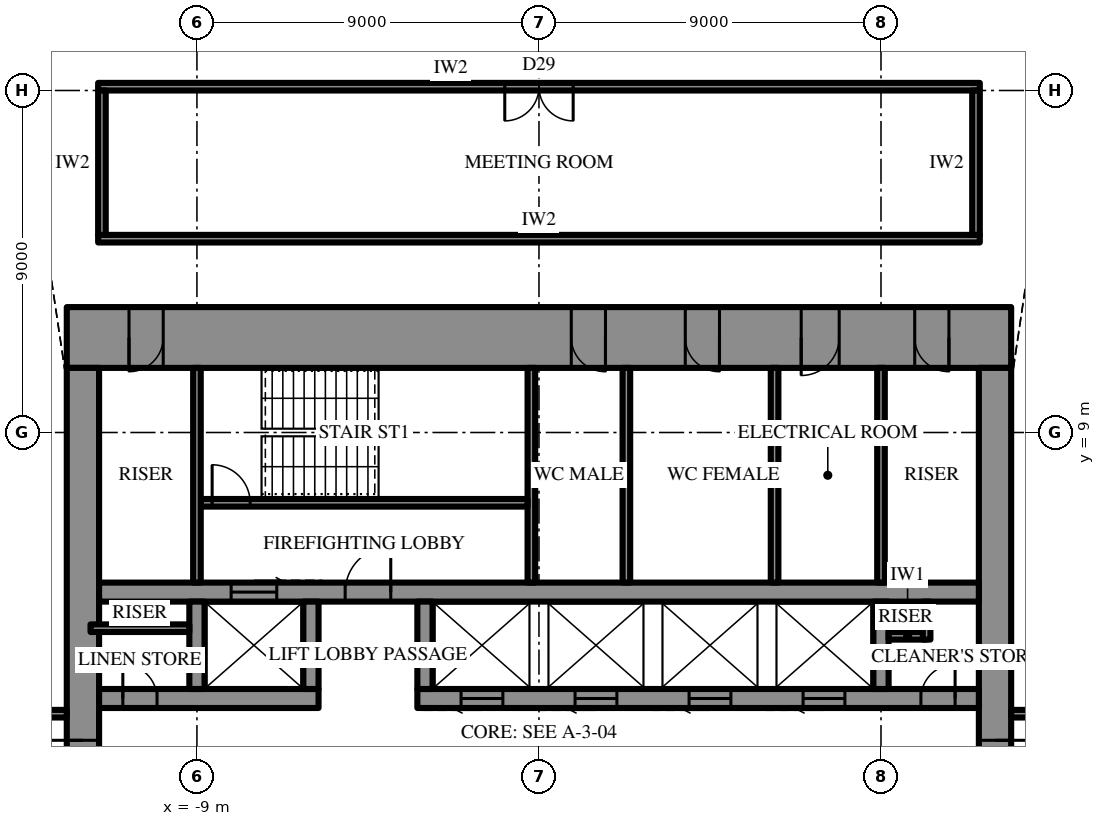
"""IFC4 building model, lengths in metres.
Left out: names, types, materials, properties, quantities, classifications, styles, units other than length and angle.
Written with IfcOpenShell. Run it as: python <this file> out.ifc"""

import sys

from ifc_helpers import new_model, si_unit, direction, frame, frame_2d, origin, place, context, subcontext, project, spatial, rectangle, extrude, element, fill, save


model = new_model("IFC4")
c1 = context("Model", 3, precision=1e-05, world=origin(), true_north=direction((0.0, 1.0)))
c2 = subcontext(c1, "Body", "Model", "MODEL_VIEW")
j1 = project(units=[si_unit("LENGTHUNIT", "METRE"), si_unit("PLANEANGLEUNIT", "RADIAN")], contexts=[c1])
p1 = place(None, origin())
s1 = spatial("IfcSite", under=j1, at=p1, CompositionType="ELEMENT")
p2 = place(p1, origin())
s2 = spatial("IfcBuilding", under=s1, at=p2, CompositionType="ELEMENT")
p3 = place(p2, frame((0.0, 0.0, 319.9)))
s3 = spatial("IfcBuildingStorey", under=s2, at=p3, CompositionType="ELEMENT", Elevation=319.9)
p4 = place(p3, frame((-12.425, 11.5, 0.0), z_axis=(0.0, 0.0, 1.0), x_axis=(1.0, 0.0, 0.0)))
e1 = element("IfcWall", 1, at=p4, inside=s3, PredefinedType="SHEAR", context=c2, shape_type="SweptSolid", body=[
    extrude(rectangle(XDim=24.85, YDim=1.6, at=frame_2d((12.425, 0.0))), origin(), (0.0, 0.0, 1.0), 4.2),
])
p5 = place(p4, frame((13.275, 0.0, 0.0)))
e2 = element("IfcOpeningElement", 2, at=p5, cuts=e1, PredefinedType="OPENING", context=c2, shape_type="SweptSolid", body=[
    extrude(rectangle(XDim=0.9, YDim=2.2, at=frame_2d((0.45, 1.1))), frame((0.0, 0.81, 0.0), z_axis=(0.0, -1.0, 0.0), x_axis=(1.0, 0.0, 0.0)), (0.0, 0.0, 1.0), 1.62),
])
p6 = place(p4, frame((16.275, 0.0, 0.0)))
e3 = element("IfcOpeningElement", 3, at=p6, cuts=e1, PredefinedType="OPENING", context=c2, shape_type="SweptSolid", body=[
    extrude(rectangle(XDim=0.9, YDim=2.2, at=frame_2d((0.45, 1.1))), frame((0.0, 0.81, 0.0), z_axis=(0.0, -1.0, 0.0), x_axis=(1.0, 0.0, 0.0)), (0.0, 0.0, 1.0), 1.62),
])
p7 = place(p4, frame((19.325, 0.0, 0.0)))
e4 = element("IfcOpeningElement", 4, at=p7, cuts=e1, PredefinedType="OPENING", context=c2, shape_type="SweptSolid", body=[
    extrude(rectangle(XDim=1.0, YDim=2.2, at=frame_2d((0.5, 1.1))), frame((0.0, 0.81, 0.0), z_axis=(0.0, -1.0, 0.0), x_axis=(1.0, 0.0, 0.0)), (0.0, 0.0, 1.0), 1.62),
])
p8 = place(p4, frame((1.637, 0.0, 0.0)))
e5 = element("IfcOpeningElement", 5, at=p8, cuts=e1, PredefinedType="OPENING", context=c2, shape_type="SweptSolid", body=[
    extrude(rectangle(XDim=0.9, YDim=2.2, at=frame_2d((0.45, 1.1))), frame((0.0, 0.81, 0.0), z_axis=(0.0, -1.0, 0.0), x_axis=(1.0, 0.0, 0.0)), (0.0, 0.0, 1.0), 1.62),
])
p9 = place(p4, frame((22.312, 0.0, 0.0)))
e6 = element("IfcOpeningElement", 6, at=p9, cuts=e1, PredefinedType="OPENING", context=c2, shape_type="SweptSolid", body=[
    extrude(rectangle(XDim=0.9, YDim=2.2, at=frame_2d((0.45, 1.1))), frame((0.0, 0.81, 0.0), z_axis=(0.0, -1.0, 0.0), x_axis=(1.0, 0.0, 0.0)), (0.0, 0.0, 1.0), 1.62),
])
p10 = place(p3, frame((12.0, -10.7, 0.0), z_axis=(0.0, 0.0, 1.0), x_axis=(0.0, 1.0, 0.0)))
e7 = element("IfcWall", 7, at=p10, inside=s3, PredefinedType="SHEAR", context=c2, shape_type="SweptSolid", body=[
    extrude(rectangle(XDim=21.4, YDim=0.85, at=frame_2d((10.7, 0.0))), origin(), (0.0, 0.0, 1.0), 4.2),
])
p11 = place(p10, frame((9.8, 0.0, 0.0)))
e8 = element("IfcOpeningElement", 8, at=p11, cuts=e7, PredefinedType="OPENING", context=c2, shape_type="SweptSolid", body=[
    extrude(rectangle(XDim=1.8, YDim=2.4, at=frame_2d((0.9, 1.2))), frame((0.0, 0.435, 0.0), z_axis=(0.0, -1.0, 0.0), x_axis=(1.0, 0.0, 0.0)), (0.0, 0.0, 1.0), 0.87),
])
p12 = place(p3, frame((-12.0, 10.7, 0.0), z_axis=(0.0, 0.0, 1.0), x_axis=(0.0, -1.0, 0.0)))
e9 = element("IfcWall", 9, at=p12, inside=s3, PredefinedType="SHEAR", context=c2, shape_type="SweptSolid", body=[
    extrude(rectangle(XDim=21.4, YDim=0.85, at=frame_2d((10.7, 0.0))), origin(), (0.0, 0.0, 1.0), 4.2),
])
p13 = place(p12, frame((9.8, 0.0, 0.0)))
e10 = element("IfcOpeningElement", 10, at=p13, cuts=e9, PredefinedType="OPENING", context=c2, shape_type="SweptSolid", body=[
    extrude(rectangle(XDim=1.8, YDim=2.4, at=frame_2d((0.9, 1.2))), frame((0.0, 0.435, 0.0), z_axis=(0.0, -1.0, 0.0), x_axis=(1.0, 0.0, 0.0)), (0.0, 0.0, 1.0), 0.87),
])
p14 = place(p3, frame((-11.575, 2.0, 0.0), z_axis=(0.0, 0.0, 1.0), x_axis=(1.0, 0.0, 0.0)))
e11 = element("IfcWall", 11, at=p14, inside=s3, PredefinedType="SHEAR", context=c2, shape_type="SweptSolid", body=[
    extrude(rectangle(XDim=5.775, YDim=0.5, at=frame_2d((2.887, 0.0))), origin(), (0.0, 0.0, 1.0), 4.2),
])
p15 = place(p14, frame((0.625, 0.0, 0.0)))
e12 = element("IfcOpeningElement", 12, at=p15, cuts=e11, PredefinedType="OPENING", context=c2, shape_type="SweptSolid", body=[
    extrude(rectangle(XDim=0.9, YDim=2.2, at=frame_2d((0.45, 1.1))), frame((0.0, 0.26, 0.0), z_axis=(0.0, -1.0, 0.0), x_axis=(1.0, 0.0, 0.0)), (0.0, 0.0, 1.0), 0.52),
])
p16 = place(p3, frame((-3.2, 2.0, 0.0), z_axis=(0.0, 0.0, 1.0), x_axis=(1.0, 0.0, 0.0)))
e13 = element("IfcWall", 13, at=p16, inside=s3, PredefinedType="SHEAR", context=c2, shape_type="SweptSolid", body=[
    extrude(rectangle(XDim=14.775, YDim=0.5, at=frame_2d((7.387, 0.0))), origin(), (0.0, 0.0, 1.0), 4.2),
])
p17 = place(p16, frame((13.25, 0.0, 0.0)))
e14 = element("IfcOpeningElement", 14, at=p17, cuts=e13, PredefinedType="OPENING", context=c2, shape_type="SweptSolid", body=[
    extrude(rectangle(XDim=0.9, YDim=2.2, at=frame_2d((0.45, 1.1))), frame((0.0, 0.26, 0.0), z_axis=(0.0, -1.0, 0.0), x_axis=(1.0, 0.0, 0.0)), (0.0, 0.0, 1.0), 0.52),
])
p18 = place(p16, frame((1.15, 0.0, 0.0)))
e15 = element("IfcOpeningElement", 15, at=p18, cuts=e13, PredefinedType="OPENING", context=c2, shape_type="SweptSolid", body=[
    extrude(rectangle(XDim=1.1, YDim=2.2, at=frame_2d((0.55, 1.1))), frame((0.0, 0.26, 0.0), z_axis=(0.0, -1.0, 0.0), x_axis=(1.0, 0.0, 0.0)), (0.0, 0.0, 1.0), 0.52),
])
p19 = place(p16, frame((4.15, 0.0, 0.0)))
e16 = element("IfcOpeningElement", 16, at=p19, cuts=e13, PredefinedType="OPENING", context=c2, shape_type="SweptSolid", body=[
    extrude(rectangle(XDim=1.1, YDim=2.2, at=frame_2d((0.55, 1.1))), frame((0.0, 0.26, 0.0), z_axis=(0.0, -1.0, 0.0), x_axis=(1.0, 0.0, 0.0)), (0.0, 0.0, 1.0), 0.52),
])
p20 = place(p16, frame((7.15, 0.0, 0.0)))
e17 = element("IfcOpeningElement", 17, at=p20, cuts=e13, PredefinedType="OPENING", context=c2, shape_type="SweptSolid", body=[
    extrude(rectangle(XDim=1.1, YDim=2.2, at=frame_2d((0.55, 1.1))), frame((0.0, 0.26, 0.0), z_axis=(0.0, -1.0, 0.0), x_axis=(1.0, 0.0, 0.0)), (0.0, 0.0, 1.0), 0.52),
])
p21 = place(p16, frame((10.15, 0.0, 0.0)))
e18 = element("IfcOpeningElement", 18, at=p21, cuts=e13, PredefinedType="OPENING", context=c2, shape_type="SweptSolid", body=[
    extrude(rectangle(XDim=1.1, YDim=2.2, at=frame_2d((0.55, 1.1))), frame((0.0, 0.26, 0.0), z_axis=(0.0, -1.0, 0.0), x_axis=(1.0, 0.0, 0.0)), (0.0, 0.0, 1.0), 0.52),
])
p22 = place(p3, frame((-11.575, 4.8, 0.0), z_axis=(0.0, 0.0, 1.0), x_axis=(1.0, 0.0, 0.0)))
e19 = element("IfcWall", 19, at=p22, inside=s3, PredefinedType="SHEAR", context=c2, shape_type="SweptSolid", body=[
    extrude(rectangle(XDim=23.15, YDim=0.5, at=frame_2d((11.575, 0.0))), origin(), (0.0, 0.0, 1.0), 4.2),
])
p23 = place(p22, frame((6.475, 0.0, 0.0)))
e20 = element("IfcOpeningElement", 20, at=p23, cuts=e19, PredefinedType="OPENING", context=c2, shape_type="SweptSolid", body=[
    extrude(rectangle(XDim=1.2, YDim=2.2, at=frame_2d((0.6, 1.1))), frame((0.0, 0.26, 0.0), z_axis=(0.0, -1.0, 0.0), x_axis=(1.0, 0.0, 0.0)), (0.0, 0.0, 1.0), 0.52),
])
p24 = place(p22, frame((3.475, 0.0, 0.0)))
e21 = element("IfcOpeningElement", 21, at=p24, cuts=e19, PredefinedType="OPENING", context=c2, shape_type="SweptSolid", body=[
    extrude(rectangle(XDim=1.2, YDim=2.2, at=frame_2d((0.6, 1.1))), frame((0.0, 0.26, 0.0), z_axis=(0.0, -1.0, 0.0), x_axis=(1.0, 0.0, 0.0)), (0.0, 0.0, 1.0), 0.52),
])
for number, where, z_axis, x_axis in (
    (22, (-9.0, 2.25, 0.0), (0.0, 0.0, 1.0), (0.0, 1.0, 0.0)),
    (23, (-6.0, 2.25, 0.0), (0.0, 0.0, 1.0), (0.0, 1.0, 0.0)),
    (24, (-3.0, 2.25, 0.0), (0.0, 0.0, 1.0), (0.0, 1.0, 0.0)),
    (25, (9.0, 2.25, 0.0), (0.0, 0.0, 1.0), (0.0, 1.0, 0.0)),
):
    element("IfcWall", number, at=place(p3, frame(where, z_axis=z_axis, x_axis=x_axis)), inside=s3, PredefinedType="SHEAR", context=c2, shape_type="SweptSolid", body=[
        extrude(rectangle(XDim=2.3, YDim=0.4, at=frame_2d((1.15, 0.0))), origin(), (0.0, 0.0, 1.0), 4.2),
    ])
p25 = place(p3, frame((-0.2, 5.05, 0.0), z_axis=(0.0, 0.0, 1.0), x_axis=(0.0, 1.0, 0.0)))
e26 = element("IfcWall", 26, at=p25, inside=s3, PredefinedType="SHEAR", context=c2, shape_type="SweptSolid", body=[
    extrude(rectangle(XDim=5.65, YDim=0.2, at=frame_2d((2.825, 0.0))), origin(), (0.0, 0.0, 1.0), 4.2),
])
p26 = place(p3, frame((-8.9, 7.15, 0.0), z_axis=(0.0, 0.0, 1.0), x_axis=(1.0, 0.0, 0.0)))
e27 = element("IfcWall", 27, at=p26, inside=s3, PredefinedType="SHEAR", context=c2, shape_type="SweptSolid", body=[
    extrude(rectangle(XDim=8.6, YDim=0.2, at=frame_2d((4.3, 0.0))), origin(), (0.0, 0.0, 1.0), 4.2),
])
p27 = place(p26, frame((0.3, 0.0, 0.0)))
e28 = element("IfcOpeningElement", 28, at=p27, cuts=e27, PredefinedType="OPENING", context=c2, shape_type="SweptSolid", body=[
    extrude(rectangle(XDim=1.0, YDim=2.2, at=frame_2d((0.5, 1.1))), frame((0.0, 0.11, 0.0), z_axis=(0.0, -1.0, 0.0), x_axis=(1.0, 0.0, 0.0)), (0.0, 0.0, 1.0), 0.22),
])
for number, where, z_axis, x_axis in (
    (29, (-9.0, 5.05, 0.0), (0.0, 0.0, 1.0), (0.0, 1.0, 0.0)),
    (30, (9.0, 5.05, 0.0), (0.0, 0.0, 1.0), (0.0, 1.0, 0.0)),
    (31, (2.3, 5.05, 0.0), (0.0, 0.0, 1.0), (0.0, 1.0, 0.0)),
    (32, (6.2, 5.05, 0.0), (0.0, 0.0, 1.0), (0.0, 1.0, 0.0)),
):
    element("IfcWall", number, at=place(p3, frame(where, z_axis=z_axis, x_axis=x_axis)), inside=s3, PredefinedType="PARTITIONING", context=c2, shape_type="SweptSolid", body=[
        extrude(rectangle(XDim=5.65, YDim=0.2, at=frame_2d((2.825, 0.0))), origin(), (0.0, 0.0, 1.0), 4.0),
    ])
p28 = place(p3, frame((-11.8, 3.85, 0.0), z_axis=(0.0, 0.0, 1.0), x_axis=(1.0, 0.0, 0.0)))
e33 = element("IfcWall", 33, at=p28, inside=s3, PredefinedType="PARTITIONING", context=c2, shape_type="SweptSolid", body=[
    extrude(rectangle(XDim=2.6, YDim=0.2, at=frame_2d((1.3, 0.0))), origin(), (0.0, 0.0, 1.0), 4.0),
])
for number, where, z_axis, x_axis in (
    (34, (9.2, 3.65, 0.0), (0.0, 0.0, 1.0), (1.0, 0.0, 0.0)),
    (35, (10.2, 3.55, 0.0), (0.0, 0.0, 1.0), (0.0, 1.0, 0.0)),
):
    element("IfcWall", number, at=place(p3, frame(where, z_axis=z_axis, x_axis=x_axis)), inside=s3, PredefinedType="PARTITIONING", context=c2, shape_type="SweptSolid", body=[
        extrude(rectangle(XDim=1.0, YDim=0.2, at=frame_2d((0.5, 0.0))), origin(), (0.0, 0.0, 1.0), 4.0),
    ])
p29 = place(p3, frame((-11.6, 14.1, 0.0), z_axis=(0.0, 0.0, 1.0), x_axis=(1.0, 0.0, 0.0)))
e36 = element("IfcWall", 36, at=p29, inside=s3, PredefinedType="PARTITIONING", context=c2, shape_type="SweptSolid", body=[
    extrude(rectangle(XDim=23.2, YDim=0.2, at=frame_2d((11.6, 0.0))), origin(), (0.0, 0.0, 1.0), 4.0),
])
p30 = place(p3, frame((-11.6, 18.1, 0.0), z_axis=(0.0, 0.0, 1.0), x_axis=(1.0, 0.0, 0.0)))
e37 = element("IfcWall", 37, at=p30, inside=s3, PredefinedType="PARTITIONING", context=c2, shape_type="SweptSolid", body=[
    extrude(rectangle(XDim=23.2, YDim=0.2, at=frame_2d((11.6, 0.0))), origin(), (0.0, 0.0, 1.0), 4.0),
])
p31 = place(p30, frame((10.7, 0.0, 0.0)))
e38 = element("IfcOpeningElement", 38, at=p31, cuts=e37, PredefinedType="OPENING", context=c2, shape_type="SweptSolid", body=[
    extrude(rectangle(XDim=1.8, YDim=2.4, at=frame_2d((0.9, 1.2))), frame((0.0, 0.11, 0.0), z_axis=(0.0, -1.0, 0.0), x_axis=(1.0, 0.0, 0.0)), (0.0, 0.0, 1.0), 0.22),
])
for number, where, z_axis, x_axis in (
    (39, (-11.5, 14.2, 0.0), (0.0, 0.0, 1.0), (0.0, 1.0, 0.0)),
    (40, (11.5, 14.2, 0.0), (0.0, 0.0, 1.0), (0.0, 1.0, 0.0)),
):
    element("IfcWall", number, at=place(p3, frame(where, z_axis=z_axis, x_axis=x_axis)), inside=s3, PredefinedType="PARTITIONING", context=c2, shape_type="SweptSolid", body=[
        extrude(rectangle(XDim=3.8, YDim=0.2, at=frame_2d((1.9, 0.0))), origin(), (0.0, 0.0, 1.0), 4.0),
    ])
p32 = place(p3, frame((12.425, 1.6, 0.0), z_axis=(0.0, 0.0, 1.0), x_axis=(1.0, 0.0, 0.0)))
e41 = element("IfcWall", 41, at=p32, inside=s3, PredefinedType="PARTITIONING", context=c2, shape_type="SweptSolid", body=[
    extrude(rectangle(XDim=16.327, YDim=0.2, at=frame_2d((8.164, 0.0))), origin(), (0.0, 0.0, 1.0), 4.0),
])
p33 = place(p32, frame((1.133, 0.0, 0.0)))
e42 = element("IfcOpeningElement", 42, at=p33, cuts=e41, PredefinedType="OPENING", context=c2, shape_type="SweptSolid", body=[
    extrude(rectangle(XDim=1.0, YDim=2.2, at=frame_2d((0.5, 1.1))), frame((0.0, 0.11, 0.0), z_axis=(0.0, -1.0, 0.0), x_axis=(1.0, 0.0, 0.0)), (0.0, 0.0, 1.0), 0.22),
])
p34 = place(p3, frame((-12.425, 1.6, 0.0), z_axis=(0.0, 0.0, 1.0), x_axis=(-1.0, 0.0, 0.0)))
e43 = element("IfcWall", 43, at=p34, inside=s3, PredefinedType="PARTITIONING", context=c2, shape_type="SweptSolid", body=[
    extrude(rectangle(XDim=16.327, YDim=0.2, at=frame_2d((8.164, 0.0))), origin(), (0.0, 0.0, 1.0), 4.0),
])
p35 = place(p34, frame((1.133, 0.0, 0.0)))
e44 = element("IfcOpeningElement", 44, at=p35, cuts=e43, PredefinedType="OPENING", context=c2, shape_type="SweptSolid", body=[
    extrude(rectangle(XDim=1.0, YDim=2.2, at=frame_2d((0.5, 1.1))), frame((0.0, 0.11, 0.0), z_axis=(0.0, -1.0, 0.0), x_axis=(1.0, 0.0, 0.0)), (0.0, 0.0, 1.0), 0.22),
])
p36 = place(p11, frame((1.8, 0.0, 0.0), z_axis=(0.0, 0.0, 1.0), x_axis=(-1.0, 0.0, 0.0)))
e45 = element("IfcDoor", 45, at=p36, inside=s3, OperationType="DOUBLE_DOOR_SINGLE_SWING", PredefinedType="DOOR", context=c2, shape_type="SweptSolid", body=[
    extrude(rectangle(XDim=1.8, YDim=2.4, at=frame_2d((0.9, 1.2))), frame((0.0, 0.025, 0.0), z_axis=(0.0, -1.0, 0.0), x_axis=(1.0, 0.0, 0.0)), (0.0, 0.0, 1.0), 0.05),
])
fill(e8, e45)
p37 = place(p13, frame((1.8, 0.0, 0.0), z_axis=(0.0, 0.0, 1.0), x_axis=(-1.0, 0.0, 0.0)))
e46 = element("IfcDoor", 46, at=p37, inside=s3, OperationType="DOUBLE_DOOR_SINGLE_SWING", PredefinedType="DOOR", context=c2, shape_type="SweptSolid", body=[
    extrude(rectangle(XDim=1.8, YDim=2.4, at=frame_2d((0.9, 1.2))), frame((0.0, 0.025, 0.0), z_axis=(0.0, -1.0, 0.0), x_axis=(1.0, 0.0, 0.0)), (0.0, 0.0, 1.0), 0.05),
])
fill(e10, e46)
p38 = place(p23, origin())
e47 = element("IfcDoor", 47, at=p38, inside=s3, OperationType="SINGLE_SWING_LEFT", PredefinedType="DOOR", context=c2, shape_type="SweptSolid", body=[
    extrude(rectangle(XDim=1.2, YDim=2.2, at=frame_2d((0.6, 1.1))), frame((0.0, 0.025, 0.0), z_axis=(0.0, -1.0, 0.0), x_axis=(1.0, 0.0, 0.0)), (0.0, 0.0, 1.0), 0.05),
])
fill(e20, e47)
p39 = place(p27, origin())
e48 = element("IfcDoor", 48, at=p39, inside=s3, OperationType="SINGLE_SWING_RIGHT", PredefinedType="DOOR", context=c2, shape_type="SweptSolid", body=[
    extrude(rectangle(XDim=1.0, YDim=2.2, at=frame_2d((0.5, 1.1))), frame((0.0, 0.025, 0.0), z_axis=(0.0, -1.0, 0.0), x_axis=(1.0, 0.0, 0.0)), (0.0, 0.0, 1.0), 0.05),
])
fill(e28, e48)
p40 = place(p5, frame((0.9, 0.0, 0.0), z_axis=(0.0, 0.0, 1.0), x_axis=(-1.0, 0.0, 0.0)))
e49 = element("IfcDoor", 49, at=p40, inside=s3, OperationType="SINGLE_SWING_RIGHT", PredefinedType="DOOR", context=c2, shape_type="SweptSolid", body=[
    extrude(rectangle(XDim=0.9, YDim=2.2, at=frame_2d((0.45, 1.1))), frame((0.0, 0.025, 0.0), z_axis=(0.0, -1.0, 0.0), x_axis=(1.0, 0.0, 0.0)), (0.0, 0.0, 1.0), 0.05),
])
fill(e2, e49)
p41 = place(p6, frame((0.9, 0.0, 0.0), z_axis=(0.0, 0.0, 1.0), x_axis=(-1.0, 0.0, 0.0)))
e50 = element("IfcDoor", 50, at=p41, inside=s3, OperationType="SINGLE_SWING_RIGHT", PredefinedType="DOOR", context=c2, shape_type="SweptSolid", body=[
    extrude(rectangle(XDim=0.9, YDim=2.2, at=frame_2d((0.45, 1.1))), frame((0.0, 0.025, 0.0), z_axis=(0.0, -1.0, 0.0), x_axis=(1.0, 0.0, 0.0)), (0.0, 0.0, 1.0), 0.05),
])
fill(e3, e50)
p42 = place(p7, frame((1.0, 0.0, 0.0), z_axis=(0.0, 0.0, 1.0), x_axis=(-1.0, 0.0, 0.0)))
e51 = element("IfcDoor", 51, at=p42, inside=s3, OperationType="SINGLE_SWING_LEFT", PredefinedType="DOOR", context=c2, shape_type="SweptSolid", body=[
    extrude(rectangle(XDim=1.0, YDim=2.2, at=frame_2d((0.5, 1.1))), frame((0.0, 0.025, 0.0), z_axis=(0.0, -1.0, 0.0), x_axis=(1.0, 0.0, 0.0)), (0.0, 0.0, 1.0), 0.05),
])
fill(e4, e51)
p43 = place(p8, frame((0.9, 0.0, 0.0), z_axis=(0.0, 0.0, 1.0), x_axis=(-1.0, 0.0, 0.0)))
e52 = element("IfcDoor", 52, at=p43, inside=s3, OperationType="SINGLE_SWING_LEFT", PredefinedType="DOOR", context=c2, shape_type="SweptSolid", body=[
    extrude(rectangle(XDim=0.9, YDim=2.2, at=frame_2d((0.45, 1.1))), frame((0.0, 0.025, 0.0), z_axis=(0.0, -1.0, 0.0), x_axis=(1.0, 0.0, 0.0)), (0.0, 0.0, 1.0), 0.05),
])
fill(e5, e52)
p44 = place(p9, frame((0.9, 0.0, 0.0), z_axis=(0.0, 0.0, 1.0), x_axis=(-1.0, 0.0, 0.0)))
e53 = element("IfcDoor", 53, at=p44, inside=s3, OperationType="SINGLE_SWING_RIGHT", PredefinedType="DOOR", context=c2, shape_type="SweptSolid", body=[
    extrude(rectangle(XDim=0.9, YDim=2.2, at=frame_2d((0.45, 1.1))), frame((0.0, 0.025, 0.0), z_axis=(0.0, -1.0, 0.0), x_axis=(1.0, 0.0, 0.0)), (0.0, 0.0, 1.0), 0.05),
])
fill(e6, e53)
p45 = place(p15, origin())
e54 = element("IfcDoor", 54, at=p45, inside=s3, OperationType="SINGLE_SWING_RIGHT", PredefinedType="DOOR", context=c2, shape_type="SweptSolid", body=[
    extrude(rectangle(XDim=0.9, YDim=2.2, at=frame_2d((0.45, 1.1))), frame((0.0, 0.025, 0.0), z_axis=(0.0, -1.0, 0.0), x_axis=(1.0, 0.0, 0.0)), (0.0, 0.0, 1.0), 0.05),
])
fill(e12, e54)
p46 = place(p17, origin())
e55 = element("IfcDoor", 55, at=p46, inside=s3, OperationType="SINGLE_SWING_LEFT", PredefinedType="DOOR", context=c2, shape_type="SweptSolid", body=[
    extrude(rectangle(XDim=0.9, YDim=2.2, at=frame_2d((0.45, 1.1))), frame((0.0, 0.025, 0.0), z_axis=(0.0, -1.0, 0.0), x_axis=(1.0, 0.0, 0.0)), (0.0, 0.0, 1.0), 0.05),
])
fill(e14, e55)
p47 = place(p24, origin())
e56 = element("IfcDoor", 56, at=p47, inside=s3, OperationType="SLIDING_TO_LEFT", PredefinedType="DOOR", context=c2, shape_type="SweptSolid", body=[
    extrude(rectangle(XDim=1.2, YDim=2.2, at=frame_2d((0.6, 1.1))), frame((0.0, 0.025, 0.0), z_axis=(0.0, -1.0, 0.0), x_axis=(1.0, 0.0, 0.0)), (0.0, 0.0, 1.0), 0.05),
])
fill(e21, e56)
p48 = place(p18, frame((1.1, 0.0, 0.0), z_axis=(0.0, 0.0, 1.0), x_axis=(-1.0, 0.0, 0.0)))
e57 = element("IfcDoor", 57, at=p48, inside=s3, OperationType="SLIDING_TO_LEFT", PredefinedType="DOOR", context=c2, shape_type="SweptSolid", body=[
    extrude(rectangle(XDim=1.1, YDim=2.2, at=frame_2d((0.55, 1.1))), frame((0.0, 0.025, 0.0), z_axis=(0.0, -1.0, 0.0), x_axis=(1.0, 0.0, 0.0)), (0.0, 0.0, 1.0), 0.05),
])
fill(e15, e57)
p49 = place(p19, frame((1.1, 0.0, 0.0), z_axis=(0.0, 0.0, 1.0), x_axis=(-1.0, 0.0, 0.0)))
e58 = element("IfcDoor", 58, at=p49, inside=s3, OperationType="SLIDING_TO_LEFT", PredefinedType="DOOR", context=c2, shape_type="SweptSolid", body=[
    extrude(rectangle(XDim=1.1, YDim=2.2, at=frame_2d((0.55, 1.1))), frame((0.0, 0.025, 0.0), z_axis=(0.0, -1.0, 0.0), x_axis=(1.0, 0.0, 0.0)), (0.0, 0.0, 1.0), 0.05),
])
fill(e16, e58)
p50 = place(p20, frame((1.1, 0.0, 0.0), z_axis=(0.0, 0.0, 1.0), x_axis=(-1.0, 0.0, 0.0)))
e59 = element("IfcDoor", 59, at=p50, inside=s3, OperationType="SLIDING_TO_LEFT", PredefinedType="DOOR", context=c2, shape_type="SweptSolid", body=[
    extrude(rectangle(XDim=1.1, YDim=2.2, at=frame_2d((0.55, 1.1))), frame((0.0, 0.025, 0.0), z_axis=(0.0, -1.0, 0.0), x_axis=(1.0, 0.0, 0.0)), (0.0, 0.0, 1.0), 0.05),
])
fill(e17, e59)
p51 = place(p21, frame((1.1, 0.0, 0.0), z_axis=(0.0, 0.0, 1.0), x_axis=(-1.0, 0.0, 0.0)))
e60 = element("IfcDoor", 60, at=p51, inside=s3, OperationType="SLIDING_TO_LEFT", PredefinedType="DOOR", context=c2, shape_type="SweptSolid", body=[
    extrude(rectangle(XDim=1.1, YDim=2.2, at=frame_2d((0.55, 1.1))), frame((0.0, 0.025, 0.0), z_axis=(0.0, -1.0, 0.0), x_axis=(1.0, 0.0, 0.0)), (0.0, 0.0, 1.0), 0.05),
])
fill(e18, e60)
p52 = place(p31, frame((1.8, 0.0, 0.0), z_axis=(0.0, 0.0, 1.0), x_axis=(-1.0, 0.0, 0.0)))
e61 = element("IfcDoor", 61, at=p52, inside=s3, OperationType="DOUBLE_DOOR_SINGLE_SWING", PredefinedType="DOOR", context=c2, shape_type="SweptSolid", body=[
    extrude(rectangle(XDim=1.8, YDim=2.4, at=frame_2d((0.9, 1.2))), frame((0.0, 0.025, 0.0), z_axis=(0.0, -1.0, 0.0), x_axis=(1.0, 0.0, 0.0)), (0.0, 0.0, 1.0), 0.05),
])
fill(e38, e61)
save(model, sys.argv[1])
